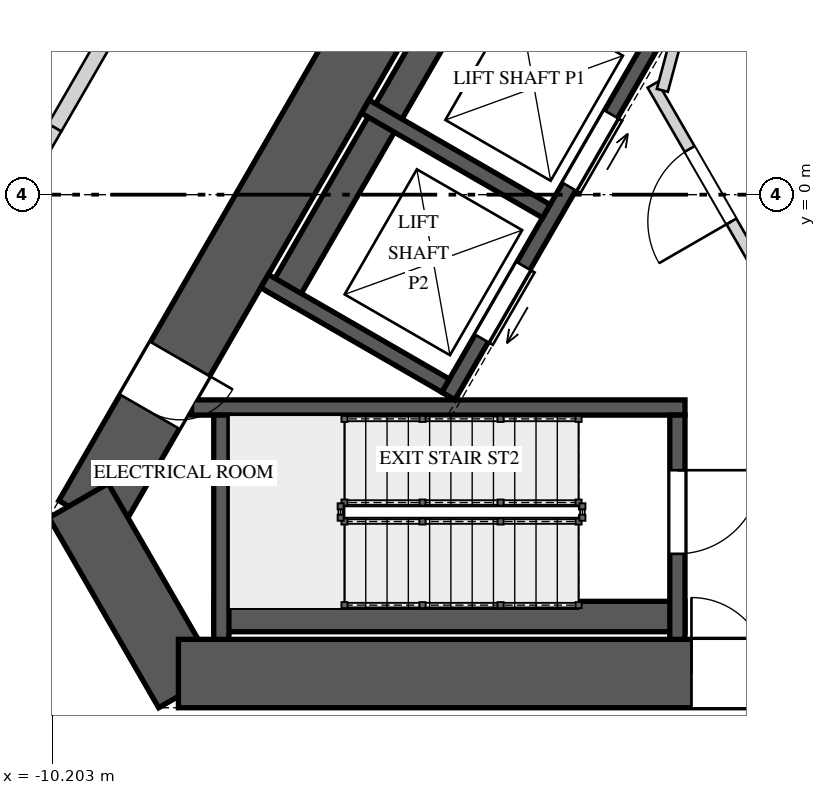
"""IFC4 building model, lengths in metres.
Left out: names, types, materials, properties, quantities, classifications, styles, units other than length and angle.
Written with IfcOpenShell. Run it as: python <this file> out.ifc"""

import sys

from ifc_helpers import new_model, si_unit, direction, frame, frame_2d, origin, place, context, subcontext, project, spatial, rectangle, extrude, element, fill, save


model = new_model("IFC4")
c1 = context("Model", 3, precision=1e-05, world=origin(), true_north=direction((0.0, 1.0)))
c2 = subcontext(c1, "Body", "Model", "MODEL_VIEW")
j1 = project(units=[si_unit("LENGTHUNIT", "METRE"), si_unit("PLANEANGLEUNIT", "RADIAN")], contexts=[c1])
p1 = place(None, origin())
s1 = spatial("IfcSite", under=j1, at=p1, CompositionType="ELEMENT")
p2 = place(p1, origin())
s2 = spatial("IfcBuilding", under=s1, at=p2, CompositionType="ELEMENT")
p3 = place(p2, frame((0.0, 0.0, 129.6)))
s3 = spatial("IfcBuildingStorey", under=s2, at=p3, CompositionType="ELEMENT", Elevation=129.6)
p4 = place(p3, frame((-1.184, 10.55, 0.0), z_axis=(0.0, 0.0, 1.0), x_axis=(-0.500004814304, -0.866022624227, 0.0)))
e1 = element("IfcWall", 1, at=p4, inside=s3, PredefinedType="SHEAR", context=c2, shape_type="SweptSolid", body=[
    extrude(rectangle(XDim=17.09, YDim=0.9, at=frame_2d((8.545, 0.0))), origin(), (0.0, 0.0, 1.0), 4.0),
])
p5 = place(p4, frame((6.75, 0.0, 0.0)))
e2 = element("IfcOpeningElement", 2, at=p5, cuts=e1, PredefinedType="OPENING", context=c2, shape_type="SweptSolid", body=[
    extrude(rectangle(XDim=1.0, YDim=2.4, at=frame_2d((0.5, 1.2))), frame((0.0, 0.46, 0.0), z_axis=(0.0, -1.0, 0.0), x_axis=(1.0, 0.0, 0.0)), (0.0, 0.0, 1.0), 0.92),
])
p6 = place(p4, frame((14.678, 0.0, 0.0)))
e3 = element("IfcOpeningElement", 3, at=p6, cuts=e1, PredefinedType="OPENING", context=c2, shape_type="SweptSolid", body=[
    extrude(rectangle(XDim=0.8, YDim=2.1, at=frame_2d((0.4, 1.05))), frame((0.0, 0.46, 0.0), z_axis=(0.0, -1.0, 0.0), x_axis=(1.0, 0.0, 0.0)), (0.0, 0.0, 1.0), 0.92),
])
p7 = place(p3, frame((-9.858, -4.025, 0.0), z_axis=(0.0, 0.0, 1.0), x_axis=(0.500059191753, -0.865991226713, 0.0)))
e4 = element("IfcWall", 4, at=p7, inside=s3, PredefinedType="SHEAR", context=c2, shape_type="SweptSolid", body=[
    extrude(rectangle(XDim=2.887, YDim=0.9, at=frame_2d((1.443, 0.0))), origin(), (0.0, 0.0, 1.0), 4.0),
])
p8 = place(p3, frame((-8.545, -6.3, 0.0), z_axis=(0.0, 0.0, 1.0), x_axis=(1.0, 0.0, 0.0)))
e5 = element("IfcWall", 5, at=p8, inside=s3, PredefinedType="SHEAR", context=c2, shape_type="SweptSolid", body=[
    extrude(rectangle(XDim=17.09, YDim=0.9, at=frame_2d((8.545, 0.0))), origin(), (0.0, 0.0, 1.0), 4.0),
])
p9 = place(p8, frame((6.75, 0.0, 0.0)))
e6 = element("IfcOpeningElement", 6, at=p9, cuts=e5, PredefinedType="OPENING", context=c2, shape_type="SweptSolid", body=[
    extrude(rectangle(XDim=1.0, YDim=2.4, at=frame_2d((0.5, 1.2))), frame((0.0, 0.46, 0.0), z_axis=(0.0, -1.0, 0.0), x_axis=(1.0, 0.0, 0.0)), (0.0, 0.0, 1.0), 0.92),
])
p10 = place(p8, frame((14.678, 0.0, 0.0)))
e7 = element("IfcOpeningElement", 7, at=p10, cuts=e5, PredefinedType="OPENING", context=c2, shape_type="SweptSolid", body=[
    extrude(rectangle(XDim=0.8, YDim=2.1, at=frame_2d((0.4, 1.05))), frame((0.0, 0.46, 0.0), z_axis=(0.0, -1.0, 0.0), x_axis=(1.0, 0.0, 0.0)), (0.0, 0.0, 1.0), 0.92),
])
p11 = place(p3, frame((-8.08, -5.55, 0.0), z_axis=(0.0, 0.0, 1.0), x_axis=(1.0, 0.0, 0.0)))
e8 = element("IfcWall", 8, at=p11, inside=s3, PredefinedType="SOLIDWALL", context=c2, shape_type="SweptSolid", body=[
    extrude(rectangle(XDim=6.2, YDim=0.4, at=frame_2d((3.1, 0.0))), origin(), (0.0, 0.0, 1.0), 3.65),
])
p12 = place(p3, frame((-8.372, -2.8, 0.0), z_axis=(0.0, 0.0, 1.0), x_axis=(1.0, 0.0, 0.0)))
e9 = element("IfcWall", 9, at=p12, inside=s3, PredefinedType="SOLIDWALL", context=c2, shape_type="SweptSolid", body=[
    extrude(rectangle(XDim=6.492, YDim=0.2, at=frame_2d((3.246, 0.0))), origin(), (0.0, 0.0, 1.0), 3.65),
])
p13 = place(p3, frame((-7.98, -2.9, 0.0), z_axis=(0.0, 0.0, 1.0), x_axis=(0.0, -1.0, 0.0)))
e10 = element("IfcWall", 10, at=p13, inside=s3, PredefinedType="SOLIDWALL", context=c2, shape_type="SweptSolid", body=[
    extrude(rectangle(XDim=2.95, YDim=0.2, at=frame_2d((1.475, 0.0))), origin(), (0.0, 0.0, 1.0), 3.65),
])
p14 = place(p3, frame((-1.98, -2.9, 0.0), z_axis=(0.0, 0.0, 1.0), x_axis=(0.0, -1.0, 0.0)))
e11 = element("IfcWall", 11, at=p14, inside=s3, PredefinedType="SOLIDWALL", context=c2, shape_type="SweptSolid", body=[
    extrude(rectangle(XDim=2.95, YDim=0.2, at=frame_2d((1.475, 0.0))), origin(), (0.0, 0.0, 1.0), 3.65),
])
p15 = place(p14, frame((0.725, 0.0, 0.0)))
e12 = element("IfcOpeningElement", 12, at=p15, cuts=e11, PredefinedType="OPENING", context=c2, shape_type="SweptSolid", body=[
    extrude(rectangle(XDim=1.1, YDim=2.4, at=frame_2d((0.55, 1.2))), frame((0.0, 0.11, 0.0), z_axis=(0.0, -1.0, 0.0), x_axis=(1.0, 0.0, 0.0)), (0.0, 0.0, 1.0), 0.22),
])
p16 = place(p3, frame((-2.243, 2.115, 0.0), z_axis=(0.0, 0.0, 1.0), x_axis=(-0.499996545922, -0.866027397988, 0.0)))
e13 = element("IfcWall", 13, at=p16, inside=s3, PredefinedType="SOLIDWALL", context=c2, shape_type="SweptSolid", body=[
    extrude(rectangle(XDim=5.5, YDim=0.2, at=frame_2d((2.75, 0.0))), origin(), (0.0, 0.0, 1.0), 3.65),
])
p17 = place(p16, frame((1.22, 0.0, 0.0)))
e14 = element("IfcOpeningElement", 14, at=p17, cuts=e13, PredefinedType="OPENING", context=c2, shape_type="SweptSolid", body=[
    extrude(rectangle(XDim=1.1, YDim=2.1, at=frame_2d((0.55, 1.05))), frame((0.0, 0.11, 0.0), z_axis=(0.0, -1.0, 0.0), x_axis=(1.0, 0.0, 0.0)), (0.0, 0.0, 1.0), 0.22),
])
p18 = place(p16, frame((3.525, 0.0, 0.0)))
e15 = element("IfcOpeningElement", 15, at=p18, cuts=e13, PredefinedType="OPENING", context=c2, shape_type="SweptSolid", body=[
    extrude(rectangle(XDim=1.1, YDim=2.1, at=frame_2d((0.55, 1.05))), frame((0.0, 0.11, 0.0), z_axis=(0.0, -1.0, 0.0), x_axis=(1.0, 0.0, 0.0)), (0.0, 0.0, 1.0), 0.22),
])
p19 = place(p3, frame((-4.451, 3.39, 0.0), z_axis=(0.0, 0.0, 1.0), x_axis=(-0.499996545922, -0.866027397988, 0.0)))
e16 = element("IfcWall", 16, at=p19, inside=s3, PredefinedType="SOLIDWALL", context=c2, shape_type="SweptSolid", body=[
    extrude(rectangle(XDim=5.5, YDim=0.4, at=frame_2d((2.75, 0.0))), origin(), (0.0, 0.0, 1.0), 3.65),
])
p20 = place(p3, frame((-3.705, -0.217, 0.0), z_axis=(0.0, 0.0, 1.0), x_axis=(-0.866027397988, 0.499996545922, 0.0)))
e17 = element("IfcWall", 17, at=p20, inside=s3, PredefinedType="SOLIDWALL", context=c2, shape_type="SweptSolid", body=[
    extrude(rectangle(XDim=2.75, YDim=0.2, at=frame_2d((1.375, 0.0))), origin(), (0.0, 0.0, 1.0), 3.65),
])
p21 = place(p3, frame((-5.03, -2.512, 0.0), z_axis=(0.0, 0.0, 1.0), x_axis=(-0.866005201286, 0.500034990121, 0.0)))
e18 = element("IfcWall", 18, at=p21, inside=s3, PredefinedType="SOLIDWALL", context=c2, shape_type="SweptSolid", body=[
    extrude(rectangle(XDim=2.75, YDim=0.2, at=frame_2d((1.375, 0.0))), origin(), (0.0, 0.0, 1.0), 3.65),
])
p22 = place(p3, frame((-0.744, -1.261, 0.0), z_axis=(0.0, 0.0, 1.0), x_axis=(-0.500004234368, 0.866022959057, 0.0)))
e19 = element("IfcWall", 19, at=p22, inside=s3, PredefinedType="PARTITIONING", context=c2, shape_type="SweptSolid", body=[
    extrude(rectangle(XDim=3.125, YDim=0.15, at=frame_2d((1.562, 0.0))), origin(), (0.0, 0.0, 1.0), 3.65),
])
p23 = place(p22, frame((1.05, 0.0, 0.0)))
e20 = element("IfcOpeningElement", 20, at=p23, cuts=e19, PredefinedType="OPENING", context=c2, shape_type="SweptSolid", body=[
    extrude(rectangle(XDim=1.1, YDim=2.4, at=frame_2d((0.55, 1.2))), frame((0.0, 0.085, 0.0), z_axis=(0.0, -1.0, 0.0), x_axis=(1.0, 0.0, 0.0)), (0.0, 0.0, 1.0), 0.17),
])
p24 = place(p3, frame((-2.178, 1.372, 0.0), z_axis=(0.0, 0.0, 1.0), x_axis=(0.258808958833, 0.96592852884, 0.0)))
e21 = element("IfcWall", 21, at=p24, inside=s3, PredefinedType="PARTITIONING", context=c2, shape_type="SweptSolid", body=[
    extrude(rectangle(XDim=2.903, YDim=0.15, at=frame_2d((1.451, 0.0))), origin(), (0.0, 0.0, 1.0), 3.65),
])
p25 = place(p3, frame((-12.195, 0.977, 0.0), z_axis=(0.0, 0.0, 1.0), x_axis=(0.499993726502, 0.86602902576, 0.0)))
e22 = element("IfcWall", 22, at=p25, inside=s3, PredefinedType="PARTITIONING", context=c2, shape_type="SweptSolid", body=[
    extrude(rectangle(XDim=4.7, YDim=0.15, at=frame_2d((2.35, 0.0))), origin(), (0.0, 0.0, 1.0), 3.65),
])
p26 = place(p25, frame((2.03, 0.0, 0.0)))
e23 = element("IfcOpeningElement", 23, at=p26, cuts=e22, PredefinedType="OPENING", context=c2, shape_type="SweptSolid", body=[
    extrude(rectangle(XDim=0.95, YDim=2.4, at=frame_2d((0.475, 1.2))), frame((0.0, 0.085, 0.0), z_axis=(0.0, -1.0, 0.0), x_axis=(1.0, 0.0, 0.0)), (0.0, 0.0, 1.0), 0.17),
])
p27 = place(p3, frame((-10.564, 0.203, 0.0), z_axis=(0.0, 0.0, 1.0), x_axis=(0.499982474044, 0.866035522163, 0.0)))
e24 = element("IfcWall", 24, at=p27, inside=s3, PredefinedType="SOLIDWALL", context=c2, shape_type="SweptSolid", body=[
    extrude(rectangle(XDim=0.786, YDim=0.2, at=frame_2d((0.393, 0.0))), origin(), (0.0, 0.0, 1.0), 2.95),
])
p28 = place(p3, frame((-10.171, 0.884, 0.0), z_axis=(0.0, 0.0, 1.0), x_axis=(0.499998034377, 0.866026538634, 0.0)))
e25 = element("IfcWall", 25, at=p28, inside=s3, PredefinedType="SOLIDWALL", context=c2, shape_type="SweptSolid", body=[
    extrude(rectangle(XDim=3.783, YDim=0.2, at=frame_2d((1.892, 0.0))), origin(), (0.0, 0.0, 1.0), 3.65),
])
p29 = place(p15, origin())
e26 = element("IfcDoor", 26, at=p29, inside=s3, OperationType="SINGLE_SWING_LEFT", PredefinedType="DOOR", context=c2, shape_type="SweptSolid", body=[
    extrude(rectangle(XDim=1.1, YDim=2.4, at=frame_2d((0.55, 1.2))), frame((0.0, 0.025, 0.0), z_axis=(0.0, -1.0, 0.0), x_axis=(1.0, 0.0, 0.0)), (0.0, 0.0, 1.0), 0.05),
])
fill(e12, e26)
p30 = place(p17, origin())
e27 = element("IfcDoor", 27, at=p30, inside=s3, OperationType="SLIDING_TO_LEFT", PredefinedType="DOOR", context=c2, shape_type="SweptSolid", body=[
    extrude(rectangle(XDim=1.1, YDim=2.1, at=frame_2d((0.55, 1.05))), frame((0.0, 0.025, 0.0), z_axis=(0.0, -1.0, 0.0), x_axis=(1.0, 0.0, 0.0)), (0.0, 0.0, 1.0), 0.05),
])
fill(e14, e27)
p31 = place(p18, origin())
e28 = element("IfcDoor", 28, at=p31, inside=s3, OperationType="SLIDING_TO_RIGHT", PredefinedType="DOOR", context=c2, shape_type="SweptSolid", body=[
    extrude(rectangle(XDim=1.1, YDim=2.1, at=frame_2d((0.55, 1.05))), frame((0.0, 0.025, 0.0), z_axis=(0.0, -1.0, 0.0), x_axis=(1.0, 0.0, 0.0)), (0.0, 0.0, 1.0), 0.05),
])
fill(e15, e28)
p32 = place(p23, origin())
e29 = element("IfcDoor", 29, at=p32, inside=s3, OperationType="SINGLE_SWING_LEFT", PredefinedType="DOOR", context=c2, shape_type="SweptSolid", body=[
    extrude(rectangle(XDim=1.1, YDim=2.4, at=frame_2d((0.55, 1.2))), frame((0.0, 0.025, 0.0), z_axis=(0.0, -1.0, 0.0), x_axis=(1.0, 0.0, 0.0)), (0.0, 0.0, 1.0), 0.05),
])
fill(e20, e29)
p33 = place(p9, origin())
e30 = element("IfcDoor", 30, at=p33, inside=s3, OperationType="SINGLE_SWING_LEFT", PredefinedType="DOOR", context=c2, shape_type="SweptSolid", body=[
    extrude(rectangle(XDim=1.0, YDim=2.4, at=frame_2d((0.5, 1.2))), frame((0.0, 0.025, 0.0), z_axis=(0.0, -1.0, 0.0), x_axis=(1.0, 0.0, 0.0)), (0.0, 0.0, 1.0), 0.05),
])
fill(e6, e30)
p34 = place(p6, origin())
e31 = element("IfcDoor", 31, at=p34, inside=s3, OperationType="SINGLE_SWING_LEFT", PredefinedType="DOOR", context=c2, shape_type="SweptSolid", body=[
    extrude(rectangle(XDim=0.8, YDim=2.1, at=frame_2d((0.4, 1.05))), frame((0.0, 0.025, 0.0), z_axis=(0.0, -1.0, 0.0), x_axis=(1.0, 0.0, 0.0)), (0.0, 0.0, 1.0), 0.05),
])
fill(e3, e31)
save(model, sys.argv[1])
